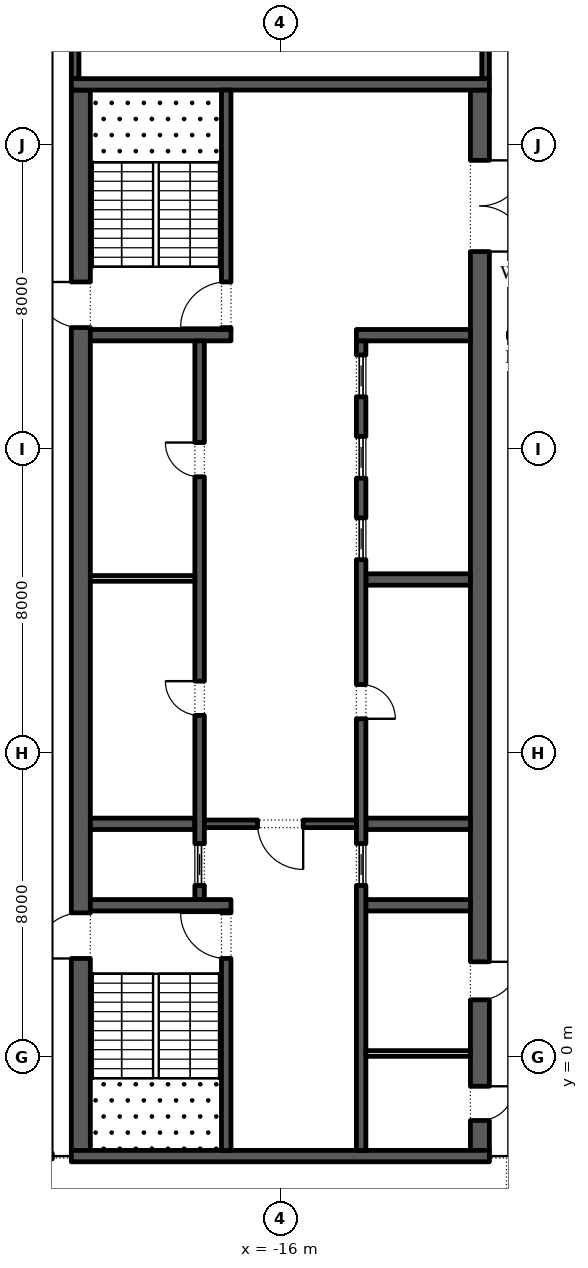
"""IFC4 building model, lengths in metres.
Left out: names, types, materials, properties, quantities, classifications, styles, units other than length and angle.
Written with IfcOpenShell. Run it as: python <this file> out.ifc"""

import sys

from ifc_helpers import new_model, si_unit, direction, frame, frame_2d, origin, place, context, subcontext, project, spatial, rectangle, extrude, element, fill, save


model = new_model("IFC4")
c1 = context("Model", 3, precision=1e-05, world=origin(), true_north=direction((0.0, 1.0)))
c2 = subcontext(c1, "Body", "Model", "MODEL_VIEW")
j1 = project(units=[si_unit("LENGTHUNIT", "METRE"), si_unit("PLANEANGLEUNIT", "RADIAN")], contexts=[c1])
p1 = place(None, origin())
s1 = spatial("IfcSite", under=j1, at=p1, CompositionType="ELEMENT")
p2 = place(p1, origin())
s2 = spatial("IfcBuilding", under=s1, at=p2, CompositionType="ELEMENT")
p3 = place(p2, frame((0.0, 0.0, 334.2)))
s3 = spatial("IfcBuildingStorey", under=s2, at=p3, CompositionType="ELEMENT", Elevation=334.2)
p4 = place(p3, frame((-21.25, -2.45, 0.0), z_axis=(0.0, 0.0, 1.0), x_axis=(0.0, 1.0, 0.0)))
e1 = element("IfcWall", 1, at=p4, inside=s3, PredefinedType="SHEAR", context=c2, shape_type="SweptSolid", body=[
    extrude(rectangle(XDim=27.9, YDim=0.5, at=frame_2d((13.95, 0.0))), origin(), (0.0, 0.0, 1.0), 4.0),
])
p5 = place(p4, frame((5.05, 0.0, 0.0)))
e2 = element("IfcOpeningElement", 2, at=p5, cuts=e1, PredefinedType="OPENING", context=c2, shape_type="SweptSolid", body=[
    extrude(rectangle(XDim=1.2, YDim=2.1, at=frame_2d((0.6, 1.05))), frame((0.0, 0.26, 0.0), z_axis=(0.0, -1.0, 0.0), x_axis=(1.0, 0.0, 0.0)), (0.0, 0.0, 1.0), 0.52),
])
p6 = place(p4, frame((21.65, 0.0, 0.0)))
e3 = element("IfcOpeningElement", 3, at=p6, cuts=e1, PredefinedType="OPENING", context=c2, shape_type="SweptSolid", body=[
    extrude(rectangle(XDim=1.2, YDim=2.1, at=frame_2d((0.6, 1.05))), frame((0.0, 0.26, 0.0), z_axis=(0.0, -1.0, 0.0), x_axis=(1.0, 0.0, 0.0)), (0.0, 0.0, 1.0), 0.52),
])
p7 = place(p3, frame((-10.75, -2.45, 0.0), z_axis=(0.0, 0.0, 1.0), x_axis=(0.0, 1.0, 0.0)))
e4 = element("IfcWall", 4, at=p7, inside=s3, PredefinedType="SHEAR", context=c2, shape_type="SweptSolid", body=[
    extrude(rectangle(XDim=27.9, YDim=0.5, at=frame_2d((13.95, 0.0))), origin(), (0.0, 0.0, 1.0), 4.0),
])
p8 = place(p7, frame((23.65, 0.0, 0.0)))
e5 = element("IfcOpeningElement", 5, at=p8, cuts=e4, PredefinedType="OPENING", context=c2, shape_type="SweptSolid", body=[
    extrude(rectangle(XDim=2.4, YDim=2.1, at=frame_2d((1.2, 1.05))), frame((0.0, 0.26, 0.0), z_axis=(0.0, -1.0, 0.0), x_axis=(1.0, 0.0, 0.0)), (0.0, 0.0, 1.0), 0.52),
])
p9 = place(p7, frame((0.788, 0.0, 0.0)))
e6 = element("IfcOpeningElement", 6, at=p9, cuts=e4, PredefinedType="OPENING", context=c2, shape_type="SweptSolid", body=[
    extrude(rectangle(XDim=0.9, YDim=2.1, at=frame_2d((0.45, 1.05))), frame((0.0, 0.26, 0.0), z_axis=(0.0, -1.0, 0.0), x_axis=(1.0, 0.0, 0.0)), (0.0, 0.0, 1.0), 0.52),
])
p10 = place(p7, frame((3.962, 0.0, 0.0)))
e7 = element("IfcOpeningElement", 7, at=p10, cuts=e4, PredefinedType="OPENING", context=c2, shape_type="SweptSolid", body=[
    extrude(rectangle(XDim=1.0, YDim=2.1, at=frame_2d((0.5, 1.05))), frame((0.0, 0.26, 0.0), z_axis=(0.0, -1.0, 0.0), x_axis=(1.0, 0.0, 0.0)), (0.0, 0.0, 1.0), 0.52),
])
for number, where, z_axis, x_axis in (
    (8, (-21.5, -2.6, 0.0), (0.0, 0.0, 1.0), (1.0, 0.0, 0.0)),
    (9, (-21.5, 25.6, 0.0), (0.0, 0.0, 1.0), (1.0, 0.0, 0.0)),
):
    element("IfcWall", number, at=place(p3, frame(where, z_axis=z_axis, x_axis=x_axis)), inside=s3, PredefinedType="SHEAR", context=c2, shape_type="SweptSolid", body=[
        extrude(rectangle(XDim=11.0, YDim=0.3, at=frame_2d((5.5, 0.0))), origin(), (0.0, 0.0, 1.0), 4.0),
    ])
p11 = place(p3, frame((-21.0, 4.0, 0.0), z_axis=(0.0, 0.0, 1.0), x_axis=(1.0, 0.0, 0.0)))
e10 = element("IfcWall", 10, at=p11, inside=s3, PredefinedType="SHEAR", context=c2, shape_type="SweptSolid", body=[
    extrude(rectangle(XDim=3.7, YDim=0.3, at=frame_2d((1.85, 0.0))), origin(), (0.0, 0.0, 1.0), 4.0),
])
p12 = place(p3, frame((-17.425, -2.45, 0.0), z_axis=(0.0, 0.0, 1.0), x_axis=(0.0, 1.0, 0.0)))
e11 = element("IfcWall", 11, at=p12, inside=s3, PredefinedType="SHEAR", context=c2, shape_type="SweptSolid", body=[
    extrude(rectangle(XDim=6.3, YDim=0.25, at=frame_2d((3.15, 0.0))), origin(), (0.0, 0.0, 1.0), 4.0),
])
p13 = place(p12, frame((5.05, 0.0, 0.0)))
e12 = element("IfcOpeningElement", 12, at=p13, cuts=e11, PredefinedType="OPENING", context=c2, shape_type="SweptSolid", body=[
    extrude(rectangle(XDim=1.2, YDim=2.1, at=frame_2d((0.6, 1.05))), frame((0.0, 0.135, 0.0), z_axis=(0.0, -1.0, 0.0), x_axis=(1.0, 0.0, 0.0)), (0.0, 0.0, 1.0), 0.27),
])
p14 = place(p3, frame((-21.0, 19.0, 0.0), z_axis=(0.0, 0.0, 1.0), x_axis=(1.0, 0.0, 0.0)))
e13 = element("IfcWall", 13, at=p14, inside=s3, PredefinedType="SHEAR", context=c2, shape_type="SweptSolid", body=[
    extrude(rectangle(XDim=3.7, YDim=0.3, at=frame_2d((1.85, 0.0))), origin(), (0.0, 0.0, 1.0), 4.0),
])
p15 = place(p3, frame((-17.425, 19.15, 0.0), z_axis=(0.0, 0.0, 1.0), x_axis=(0.0, 1.0, 0.0)))
e14 = element("IfcWall", 14, at=p15, inside=s3, PredefinedType="SHEAR", context=c2, shape_type="SweptSolid", body=[
    extrude(rectangle(XDim=6.3, YDim=0.25, at=frame_2d((3.15, 0.0))), origin(), (0.0, 0.0, 1.0), 4.0),
])
p16 = place(p15, frame((0.05, 0.0, 0.0)))
e15 = element("IfcOpeningElement", 15, at=p16, cuts=e14, PredefinedType="OPENING", context=c2, shape_type="SweptSolid", body=[
    extrude(rectangle(XDim=1.2, YDim=2.1, at=frame_2d((0.6, 1.05))), frame((0.0, 0.135, 0.0), z_axis=(0.0, -1.0, 0.0), x_axis=(1.0, 0.0, 0.0)), (0.0, 0.0, 1.0), 0.27),
])
p17 = place(p3, frame((-21.0, 6.143, 0.0), z_axis=(0.0, 0.0, 1.0), x_axis=(1.0, 0.0, 0.0)))
e16 = element("IfcWall", 16, at=p17, inside=s3, PredefinedType="SHEAR", context=c2, shape_type="SweptSolid", body=[
    extrude(rectangle(XDim=2.75, YDim=0.3, at=frame_2d((1.375, 0.0))), origin(), (0.0, 0.0, 1.0), 4.0),
])
p18 = place(p3, frame((-18.125, 4.15, 0.0), z_axis=(0.0, 0.0, 1.0), x_axis=(0.0, 1.0, 0.0)))
e17 = element("IfcWall", 17, at=p18, inside=s3, PredefinedType="SHEAR", context=c2, shape_type="SweptSolid", body=[
    extrude(rectangle(XDim=14.7, YDim=0.25, at=frame_2d((7.35, 0.0))), origin(), (0.0, 0.0, 1.0), 4.0),
])
p19 = place(p18, frame((4.846, 0.0, 0.0)))
e18 = element("IfcOpeningElement", 18, at=p19, cuts=e17, PredefinedType="OPENING", context=c2, shape_type="SweptSolid", body=[
    extrude(rectangle(XDim=0.9, YDim=2.1, at=frame_2d((0.45, 1.05))), frame((0.0, 0.135, 0.0), z_axis=(0.0, -1.0, 0.0), x_axis=(1.0, 0.0, 0.0)), (0.0, 0.0, 1.0), 0.27),
])
p20 = place(p18, frame((11.125, 0.0, 0.0)))
e19 = element("IfcOpeningElement", 19, at=p20, cuts=e17, PredefinedType="OPENING", context=c2, shape_type="SweptSolid", body=[
    extrude(rectangle(XDim=0.9, YDim=2.1, at=frame_2d((0.45, 1.05))), frame((0.0, 0.135, 0.0), z_axis=(0.0, -1.0, 0.0), x_axis=(1.0, 0.0, 0.0)), (0.0, 0.0, 1.0), 0.27),
])
p21 = place(p18, frame((0.371, 0.0, 0.0)))
e20 = element("IfcOpeningElement", 20, at=p21, cuts=e17, PredefinedType="OPENING", context=c2, shape_type="SweptSolid", body=[
    extrude(rectangle(XDim=1.1, YDim=2.1, at=frame_2d((0.55, 1.05))), frame((0.0, 0.135, 0.0), z_axis=(0.0, -1.0, 0.0), x_axis=(1.0, 0.0, 0.0)), (0.0, 0.0, 1.0), 0.27),
])
p22 = place(p3, frame((-21.0, 12.6, 0.0), z_axis=(0.0, 0.0, 1.0), x_axis=(1.0, 0.0, 0.0)))
e21 = element("IfcWall", 21, at=p22, inside=s3, PredefinedType="PARTITIONING", context=c2, shape_type="SweptSolid", body=[
    extrude(rectangle(XDim=2.75, YDim=0.15, at=frame_2d((1.375, 0.0))), origin(), (0.0, 0.0, 1.0), 4.0),
])
p23 = place(p3, frame((-14.0, 4.0, 0.0), z_axis=(0.0, 0.0, 1.0), x_axis=(1.0, 0.0, 0.0)))
e22 = element("IfcWall", 22, at=p23, inside=s3, PredefinedType="SHEAR", context=c2, shape_type="SweptSolid", body=[
    extrude(rectangle(XDim=3.0, YDim=0.3, at=frame_2d((1.5, 0.0))), origin(), (0.0, 0.0, 1.0), 4.0),
])
for number, where, z_axis, x_axis in (
    (23, (-13.75, 6.143, 0.0), (0.0, 0.0, 1.0), (1.0, 0.0, 0.0)),
    (24, (-13.75, 12.571, 0.0), (0.0, 0.0, 1.0), (1.0, 0.0, 0.0)),
):
    element("IfcWall", number, at=place(p3, frame(where, z_axis=z_axis, x_axis=x_axis)), inside=s3, PredefinedType="SHEAR", context=c2, shape_type="SweptSolid", body=[
        extrude(rectangle(XDim=2.75, YDim=0.3, at=frame_2d((1.375, 0.0))), origin(), (0.0, 0.0, 1.0), 4.0),
    ])
p24 = place(p3, frame((-14.0, 19.0, 0.0), z_axis=(0.0, 0.0, 1.0), x_axis=(1.0, 0.0, 0.0)))
e25 = element("IfcWall", 25, at=p24, inside=s3, PredefinedType="SHEAR", context=c2, shape_type="SweptSolid", body=[
    extrude(rectangle(XDim=3.0, YDim=0.3, at=frame_2d((1.5, 0.0))), origin(), (0.0, 0.0, 1.0), 4.0),
])
p25 = place(p3, frame((-13.875, -2.45, 0.0), z_axis=(0.0, 0.0, 1.0), x_axis=(0.0, 1.0, 0.0)))
e26 = element("IfcWall", 26, at=p25, inside=s3, PredefinedType="SHEAR", context=c2, shape_type="SweptSolid", body=[
    extrude(rectangle(XDim=21.3, YDim=0.25, at=frame_2d((10.65, 0.0))), origin(), (0.0, 0.0, 1.0), 4.0),
])
p26 = place(p25, frame((11.357, 0.0, 0.0)))
e27 = element("IfcOpeningElement", 27, at=p26, cuts=e26, PredefinedType="OPENING", context=c2, shape_type="SweptSolid", body=[
    extrude(rectangle(XDim=0.9, YDim=2.1, at=frame_2d((0.45, 1.05))), frame((0.0, 0.135, 0.0), z_axis=(0.0, -1.0, 0.0), x_axis=(1.0, 0.0, 0.0)), (0.0, 0.0, 1.0), 0.27),
])
p27 = place(p25, frame((6.971, 0.0, 0.0)))
e28 = element("IfcOpeningElement", 28, at=p27, cuts=e26, PredefinedType="OPENING", context=c2, shape_type="SweptSolid", body=[
    extrude(rectangle(XDim=1.1, YDim=2.1, at=frame_2d((0.55, 1.05))), frame((0.0, 0.135, 0.0), z_axis=(0.0, -1.0, 0.0), x_axis=(1.0, 0.0, 0.0)), (0.0, 0.0, 1.0), 0.27),
])
p28 = place(p25, frame((15.543, 0.0, 0.0)))
e29 = element("IfcOpeningElement", 29, at=p28, cuts=e26, PredefinedType="OPENING", context=c2, shape_type="SweptSolid", body=[
    extrude(rectangle(XDim=1.1, YDim=2.1, at=frame_2d((0.55, 1.05))), frame((0.0, 0.135, 0.0), z_axis=(0.0, -1.0, 0.0), x_axis=(1.0, 0.0, 0.0)), (0.0, 0.0, 1.0), 0.27),
])
p29 = place(p25, frame((17.686, 0.0, 0.0)))
e30 = element("IfcOpeningElement", 30, at=p29, cuts=e26, PredefinedType="OPENING", context=c2, shape_type="SweptSolid", body=[
    extrude(rectangle(XDim=1.1, YDim=2.1, at=frame_2d((0.55, 1.05))), frame((0.0, 0.135, 0.0), z_axis=(0.0, -1.0, 0.0), x_axis=(1.0, 0.0, 0.0)), (0.0, 0.0, 1.0), 0.27),
])
p30 = place(p25, frame((19.829, 0.0, 0.0)))
e31 = element("IfcOpeningElement", 31, at=p30, cuts=e26, PredefinedType="OPENING", context=c2, shape_type="SweptSolid", body=[
    extrude(rectangle(XDim=1.1, YDim=2.1, at=frame_2d((0.55, 1.05))), frame((0.0, 0.135, 0.0), z_axis=(0.0, -1.0, 0.0), x_axis=(1.0, 0.0, 0.0)), (0.0, 0.0, 1.0), 0.27),
])
p31 = place(p3, frame((-18.0, 6.143, 0.0), z_axis=(0.0, 0.0, 1.0), x_axis=(1.0, 0.0, 0.0)))
e32 = element("IfcWall", 32, at=p31, inside=s3, PredefinedType="SHEAR", context=c2, shape_type="SweptSolid", body=[
    extrude(rectangle(XDim=4.0, YDim=0.2, at=frame_2d((2.0, 0.0))), origin(), (0.0, 0.0, 1.0), 4.0),
])
p32 = place(p31, frame((1.4, 0.0, 0.0)))
e33 = element("IfcOpeningElement", 33, at=p32, cuts=e32, PredefinedType="OPENING", context=c2, shape_type="SweptSolid", body=[
    extrude(rectangle(XDim=1.2, YDim=2.1, at=frame_2d((0.6, 1.05))), frame((0.0, 0.11, 0.0), z_axis=(0.0, -1.0, 0.0), x_axis=(1.0, 0.0, 0.0)), (0.0, 0.0, 1.0), 0.22),
])
p33 = place(p3, frame((-13.75, 0.1, 0.0), z_axis=(0.0, 0.0, 1.0), x_axis=(1.0, 0.0, 0.0)))
e34 = element("IfcWall", 34, at=p33, inside=s3, PredefinedType="PARTITIONING", context=c2, shape_type="SweptSolid", body=[
    extrude(rectangle(XDim=2.75, YDim=0.15, at=frame_2d((1.375, 0.0))), origin(), (0.0, 0.0, 1.0), 4.0),
])
p34 = place(p3, frame((-21.4, 25.75, 0.0), z_axis=(0.0, 0.0, 1.0), x_axis=(0.0, 1.0, 0.0)))
e35 = element("IfcWall", 35, at=p34, inside=s3, PredefinedType="SHEAR", context=c2, shape_type="SweptSolid", body=[
    extrude(rectangle(XDim=15.05, YDim=0.2, at=frame_2d((7.525, 0.0))), origin(), (0.0, 0.0, 1.0), 4.0),
])
p35 = place(p3, frame((-10.6, 25.75, 0.0), z_axis=(0.0, 0.0, 1.0), x_axis=(0.0, 1.0, 0.0)))
e36 = element("IfcWall", 36, at=p35, inside=s3, PredefinedType="SHEAR", context=c2, shape_type="SweptSolid", body=[
    extrude(rectangle(XDim=15.05, YDim=0.2, at=frame_2d((7.525, 0.0))), origin(), (0.0, 0.0, 1.0), 4.0),
])
p36 = place(p35, frame((7.075, 0.0, 0.0)))
e37 = element("IfcOpeningElement", 37, at=p36, cuts=e36, PredefinedType="OPENING", context=c2, shape_type="SweptSolid", body=[
    extrude(rectangle(XDim=0.9, YDim=2.1, at=frame_2d((0.45, 1.05))), frame((0.0, 0.11, 0.0), z_axis=(0.0, -1.0, 0.0), x_axis=(1.0, 0.0, 0.0)), (0.0, 0.0, 1.0), 0.22),
])
p37 = place(p3, frame((-10.0, 19.0, 0.0), z_axis=(0.0, 0.0, 1.0), x_axis=(1.0, 0.0, 0.0)))
e38 = element("IfcWall", 38, at=p37, inside=s3, PredefinedType="PARTITIONING", context=c2, shape_type="SweptSolid", body=[
    extrude(rectangle(XDim=1.515, YDim=0.15, at=frame_2d((0.757, 0.0))), origin(), (0.0, 0.0, 1.0), 4.0),
])
p38 = place(p37, frame((0.258, 0.0, 0.0)))
e39 = element("IfcOpeningElement", 39, at=p38, cuts=e38, PredefinedType="OPENING", context=c2, shape_type="SweptSolid", body=[
    extrude(rectangle(XDim=1.0, YDim=2.1, at=frame_2d((0.5, 1.05))), frame((0.0, 0.085, 0.0), z_axis=(0.0, -1.0, 0.0), x_axis=(1.0, 0.0, 0.0)), (0.0, 0.0, 1.0), 0.17),
])
p39 = place(p19, origin())
e40 = element("IfcDoor", 40, at=p39, inside=s3, OperationType="SINGLE_SWING_LEFT", PredefinedType="DOOR", context=c2, shape_type="SweptSolid", body=[
    extrude(rectangle(XDim=0.9, YDim=2.1, at=frame_2d((0.45, 1.05))), frame((0.0, 0.125, 0.0), z_axis=(0.0, -1.0, 0.0), x_axis=(1.0, 0.0, 0.0)), (0.0, 0.0, 1.0), 0.05),
])
fill(e18, e40)
p40 = place(p20, origin())
e41 = element("IfcDoor", 41, at=p40, inside=s3, OperationType="SINGLE_SWING_LEFT", PredefinedType="DOOR", context=c2, shape_type="SweptSolid", body=[
    extrude(rectangle(XDim=0.9, YDim=2.1, at=frame_2d((0.45, 1.05))), frame((0.0, 0.125, 0.0), z_axis=(0.0, -1.0, 0.0), x_axis=(1.0, 0.0, 0.0)), (0.0, 0.0, 1.0), 0.05),
])
fill(e19, e41)
p41 = place(p21, origin())
e42 = element("IfcDoor", 42, at=p41, inside=s3, OperationType="SLIDING_TO_LEFT", PredefinedType="DOOR", context=c2, shape_type="SweptSolid", body=[
    extrude(rectangle(XDim=1.1, YDim=2.1, at=frame_2d((0.55, 1.05))), frame((0.0, 0.025, 0.0), z_axis=(0.0, -1.0, 0.0), x_axis=(1.0, 0.0, 0.0)), (0.0, 0.0, 1.0), 0.05),
])
fill(e20, e42)
p42 = place(p26, frame((0.9, -0.2, 0.0), z_axis=(0.0, 0.0, 1.0), x_axis=(-1.0, 0.0, 0.0)))
e43 = element("IfcDoor", 43, at=p42, inside=s3, OperationType="SINGLE_SWING_LEFT", PredefinedType="DOOR", context=c2, shape_type="SweptSolid", body=[
    extrude(rectangle(XDim=0.9, YDim=2.1, at=frame_2d((0.45, 1.05))), frame((0.0, -0.075, 0.0), z_axis=(0.0, -1.0, 0.0), x_axis=(1.0, 0.0, 0.0)), (0.0, 0.0, 1.0), 0.05),
])
fill(e27, e43)
p43 = place(p27, origin())
e44 = element("IfcDoor", 44, at=p43, inside=s3, OperationType="SLIDING_TO_LEFT", PredefinedType="DOOR", context=c2, shape_type="SweptSolid", body=[
    extrude(rectangle(XDim=1.1, YDim=2.1, at=frame_2d((0.55, 1.05))), frame((0.0, 0.025, 0.0), z_axis=(0.0, -1.0, 0.0), x_axis=(1.0, 0.0, 0.0)), (0.0, 0.0, 1.0), 0.05),
])
fill(e28, e44)
p44 = place(p28, origin())
e45 = element("IfcDoor", 45, at=p44, inside=s3, OperationType="SLIDING_TO_LEFT", PredefinedType="DOOR", context=c2, shape_type="SweptSolid", body=[
    extrude(rectangle(XDim=1.1, YDim=2.1, at=frame_2d((0.55, 1.05))), frame((0.0, 0.025, 0.0), z_axis=(0.0, -1.0, 0.0), x_axis=(1.0, 0.0, 0.0)), (0.0, 0.0, 1.0), 0.05),
])
fill(e29, e45)
p45 = place(p29, origin())
e46 = element("IfcDoor", 46, at=p45, inside=s3, OperationType="SLIDING_TO_LEFT", PredefinedType="DOOR", context=c2, shape_type="SweptSolid", body=[
    extrude(rectangle(XDim=1.1, YDim=2.1, at=frame_2d((0.55, 1.05))), frame((0.0, 0.025, 0.0), z_axis=(0.0, -1.0, 0.0), x_axis=(1.0, 0.0, 0.0)), (0.0, 0.0, 1.0), 0.05),
])
fill(e30, e46)
p46 = place(p30, origin())
e47 = element("IfcDoor", 47, at=p46, inside=s3, OperationType="SLIDING_TO_LEFT", PredefinedType="DOOR", context=c2, shape_type="SweptSolid", body=[
    extrude(rectangle(XDim=1.1, YDim=2.1, at=frame_2d((0.55, 1.05))), frame((0.0, 0.025, 0.0), z_axis=(0.0, -1.0, 0.0), x_axis=(1.0, 0.0, 0.0)), (0.0, 0.0, 1.0), 0.05),
])
fill(e31, e47)
p47 = place(p32, frame((1.2, 0.0, 0.0), z_axis=(0.0, 0.0, 1.0), x_axis=(-1.0, 0.0, 0.0)))
e48 = element("IfcDoor", 48, at=p47, inside=s3, OperationType="SINGLE_SWING_RIGHT", PredefinedType="DOOR", context=c2, shape_type="SweptSolid", body=[
    extrude(rectangle(XDim=1.2, YDim=2.1, at=frame_2d((0.6, 1.05))), frame((0.0, 0.025, 0.0), z_axis=(0.0, -1.0, 0.0), x_axis=(1.0, 0.0, 0.0)), (0.0, 0.0, 1.0), 0.05),
])
fill(e33, e48)
p48 = place(p8, frame((2.4, 0.0, 0.0), z_axis=(0.0, 0.0, 1.0), x_axis=(-1.0, 0.0, 0.0)))
e49 = element("IfcDoor", 49, at=p48, inside=s3, OperationType="DOUBLE_DOOR_SINGLE_SWING", PredefinedType="DOOR", context=c2, shape_type="SweptSolid", body=[
    extrude(rectangle(XDim=2.4, YDim=2.1, at=frame_2d((1.2, 1.05))), frame((0.0, 0.025, 0.0), z_axis=(0.0, -1.0, 0.0), x_axis=(1.0, 0.0, 0.0)), (0.0, 0.0, 1.0), 0.05),
])
fill(e5, e49)
p49 = place(p13, origin())
e50 = element("IfcDoor", 50, at=p49, inside=s3, OperationType="SINGLE_SWING_LEFT", PredefinedType="DOOR", context=c2, shape_type="SweptSolid", body=[
    extrude(rectangle(XDim=1.2, YDim=2.1, at=frame_2d((0.6, 1.05))), frame((0.0, 0.025, 0.0), z_axis=(0.0, -1.0, 0.0), x_axis=(1.0, 0.0, 0.0)), (0.0, 0.0, 1.0), 0.05),
])
fill(e12, e50)
p50 = place(p5, origin())
e51 = element("IfcDoor", 51, at=p50, inside=s3, OperationType="SINGLE_SWING_RIGHT", PredefinedType="DOOR", context=c2, shape_type="SweptSolid", body=[
    extrude(rectangle(XDim=1.2, YDim=2.1, at=frame_2d((0.6, 1.05))), frame((0.0, 0.025, 0.0), z_axis=(0.0, -1.0, 0.0), x_axis=(1.0, 0.0, 0.0)), (0.0, 0.0, 1.0), 0.05),
])
fill(e2, e51)
p51 = place(p16, origin())
e52 = element("IfcDoor", 52, at=p51, inside=s3, OperationType="SINGLE_SWING_RIGHT", PredefinedType="DOOR", context=c2, shape_type="SweptSolid", body=[
    extrude(rectangle(XDim=1.2, YDim=2.1, at=frame_2d((0.6, 1.05))), frame((0.0, 0.025, 0.0), z_axis=(0.0, -1.0, 0.0), x_axis=(1.0, 0.0, 0.0)), (0.0, 0.0, 1.0), 0.05),
])
fill(e15, e52)
p52 = place(p6, origin())
e53 = element("IfcDoor", 53, at=p52, inside=s3, OperationType="SINGLE_SWING_LEFT", PredefinedType="DOOR", context=c2, shape_type="SweptSolid", body=[
    extrude(rectangle(XDim=1.2, YDim=2.1, at=frame_2d((0.6, 1.05))), frame((0.0, 0.025, 0.0), z_axis=(0.0, -1.0, 0.0), x_axis=(1.0, 0.0, 0.0)), (0.0, 0.0, 1.0), 0.05),
])
fill(e3, e53)
p53 = place(p9, frame((0.9, 0.45, 0.0), z_axis=(0.0, 0.0, 1.0), x_axis=(-1.0, 0.0, 0.0)))
e54 = element("IfcDoor", 54, at=p53, inside=s3, OperationType="SINGLE_SWING_RIGHT", PredefinedType="DOOR", context=c2, shape_type="SweptSolid", body=[
    extrude(rectangle(XDim=0.9, YDim=2.1, at=frame_2d((0.45, 1.05))), frame((0.0, 0.25, 0.0), z_axis=(0.0, -1.0, 0.0), x_axis=(1.0, 0.0, 0.0)), (0.0, 0.0, 1.0), 0.05),
])
fill(e6, e54)
p54 = place(p10, frame((1.0, 0.45, 0.0), z_axis=(0.0, 0.0, 1.0), x_axis=(-1.0, 0.0, 0.0)))
e55 = element("IfcDoor", 55, at=p54, inside=s3, OperationType="SINGLE_SWING_RIGHT", PredefinedType="DOOR", context=c2, shape_type="SweptSolid", body=[
    extrude(rectangle(XDim=1.0, YDim=2.1, at=frame_2d((0.5, 1.05))), frame((0.0, 0.25, 0.0), z_axis=(0.0, -1.0, 0.0), x_axis=(1.0, 0.0, 0.0)), (0.0, 0.0, 1.0), 0.05),
])
fill(e7, e55)
save(model, sys.argv[1])
